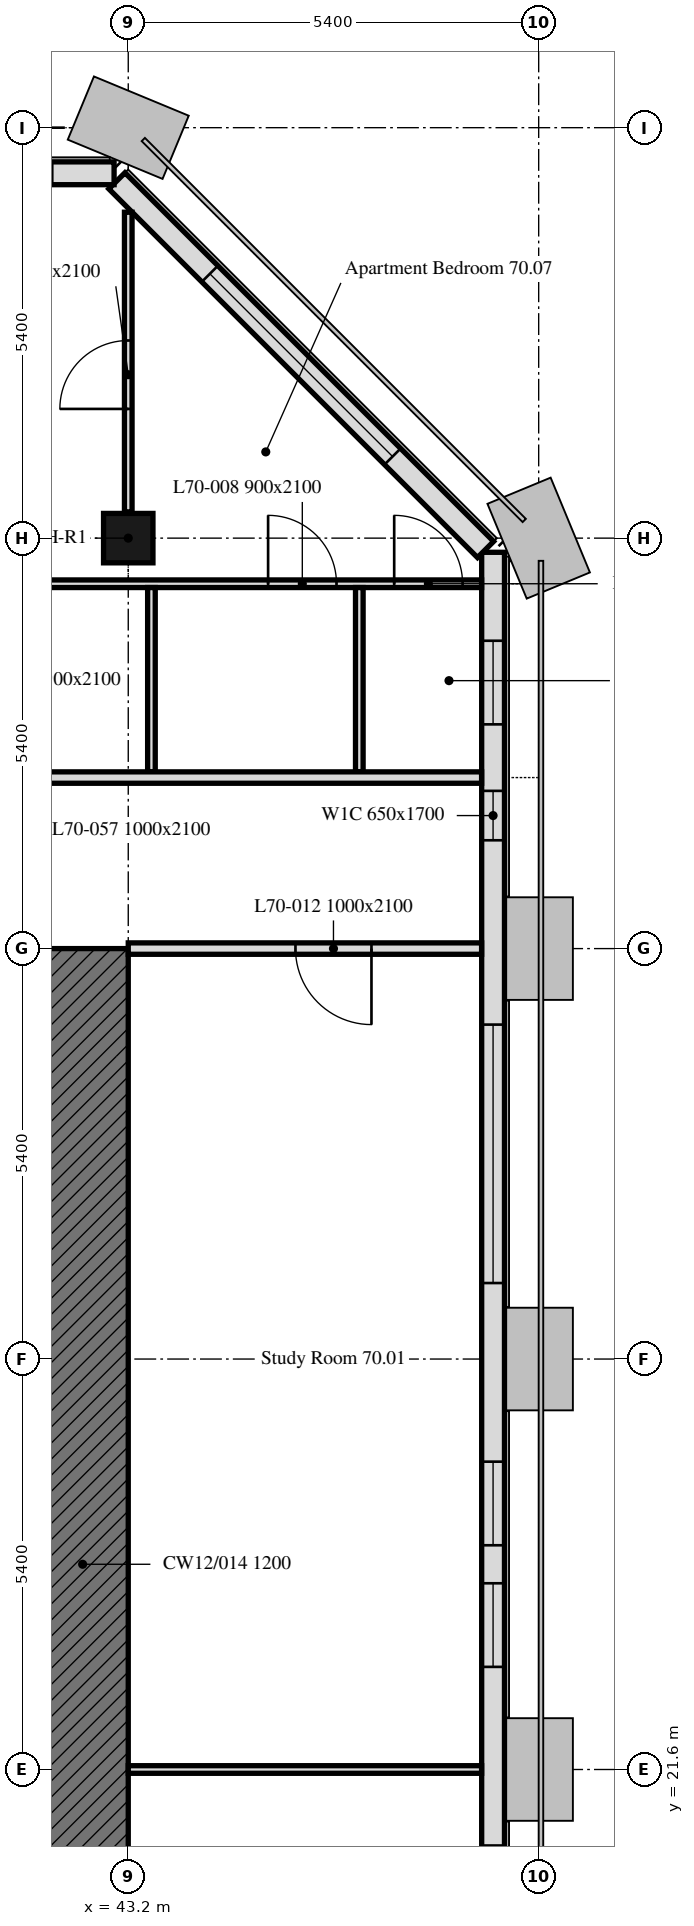
"""IFC4 building model, lengths in metres.
Left out: names, types, materials, properties, quantities, classifications, styles, units other than length and angle.
Written with IfcOpenShell. Run it as: python <this file> out.ifc"""

import sys

from ifc_helpers import new_model, si_unit, direction, frame, frame_2d, origin, origin_2d, place, context, subcontext, project, spatial, rectangle, extrude, element, fill, save


model = new_model("IFC4")
c1 = context("Model", 3, precision=1e-05, world=origin(), true_north=direction((0.0, 1.0)))
c2 = subcontext(c1, "Body", "Model", "MODEL_VIEW")
j1 = project(units=[si_unit("LENGTHUNIT", "METRE"), si_unit("PLANEANGLEUNIT", "RADIAN")], contexts=[c1])
p1 = place(None, origin())
s1 = spatial("IfcSite", under=j1, at=p1, CompositionType="ELEMENT")
p2 = place(p1, origin())
s2 = spatial("IfcBuilding", under=s1, at=p2, CompositionType="ELEMENT")
p3 = place(p2, frame((0.0, 0.0, 285.1)))
s3 = spatial("IfcBuildingStorey", under=s2, at=p3, CompositionType="ELEMENT", Elevation=285.1)
p4 = place(p3, frame((43.2, 37.8, 0.0), z_axis=(0.0, 0.0, 1.0), x_axis=(1.0, 0.0, 0.0)))
e1 = element("IfcColumn", 1, at=p4, inside=s3, PredefinedType="COLUMN", context=c2, shape_type="SweptSolid", body=[
    extrude(rectangle(XDim=0.65, YDim=0.65, at=origin_2d()), origin(), (0.0, 0.0, 1.0), 3.0),
])
p5 = place(p3, frame((48.0, 5.586, 0.0), z_axis=(0.0, 0.0, 1.0), x_axis=(0.0, 1.0, 0.0)))
e2 = element("IfcWall", 2, at=p5, inside=s3, PredefinedType="SOLIDWALL", context=c2, shape_type="SweptSolid", body=[
    extrude(rectangle(XDim=32.027, YDim=0.3, at=frame_2d((16.014, 0.0))), origin(), (0.0, 0.0, 1.0), 3.0),
])
p6 = place(p5, frame((0.814, 0.0, 0.9)))
e3 = element("IfcOpeningElement", 3, at=p6, cuts=e2, PredefinedType="OPENING", context=c2, shape_type="SweptSolid", body=[
    extrude(rectangle(XDim=3.4, YDim=1.7, at=frame_2d((1.7, 0.85))), frame((0.0, 0.16, 0.0), z_axis=(0.0, -1.0, 0.0), x_axis=(1.0, 0.0, 0.0)), (0.0, 0.0, 1.0), 0.32),
])
p7 = place(p5, frame((6.564, 0.0, 0.9)))
e4 = element("IfcOpeningElement", 4, at=p7, cuts=e2, PredefinedType="OPENING", context=c2, shape_type="SweptSolid", body=[
    extrude(rectangle(XDim=1.1, YDim=1.7, at=frame_2d((0.55, 0.85))), frame((0.0, 0.16, 0.0), z_axis=(0.0, -1.0, 0.0), x_axis=(1.0, 0.0, 0.0)), (0.0, 0.0, 1.0), 0.32),
])
p8 = place(p5, frame((8.514, 0.0, 0.9)))
e5 = element("IfcOpeningElement", 5, at=p8, cuts=e2, PredefinedType="OPENING", context=c2, shape_type="SweptSolid", body=[
    extrude(rectangle(XDim=1.1, YDim=1.7, at=frame_2d((0.55, 0.85))), frame((0.0, 0.16, 0.0), z_axis=(0.0, -1.0, 0.0), x_axis=(1.0, 0.0, 0.0)), (0.0, 0.0, 1.0), 0.32),
])
p9 = place(p5, frame((11.614, 0.0, 0.9)))
e6 = element("IfcOpeningElement", 6, at=p9, cuts=e2, PredefinedType="OPENING", context=c2, shape_type="SweptSolid", body=[
    extrude(rectangle(XDim=3.4, YDim=1.7, at=frame_2d((1.7, 0.85))), frame((0.0, 0.16, 0.0), z_axis=(0.0, -1.0, 0.0), x_axis=(1.0, 0.0, 0.0)), (0.0, 0.0, 1.0), 0.32),
])
p10 = place(p5, frame((17.364, 0.0, 0.9)))
e7 = element("IfcOpeningElement", 7, at=p10, cuts=e2, PredefinedType="OPENING", context=c2, shape_type="SweptSolid", body=[
    extrude(rectangle(XDim=1.1, YDim=1.7, at=frame_2d((0.55, 0.85))), frame((0.0, 0.16, 0.0), z_axis=(0.0, -1.0, 0.0), x_axis=(1.0, 0.0, 0.0)), (0.0, 0.0, 1.0), 0.32),
])
p11 = place(p5, frame((18.964, 0.0, 0.9)))
e8 = element("IfcOpeningElement", 8, at=p11, cuts=e2, PredefinedType="OPENING", context=c2, shape_type="SweptSolid", body=[
    extrude(rectangle(XDim=1.1, YDim=1.7, at=frame_2d((0.55, 0.85))), frame((0.0, 0.16, 0.0), z_axis=(0.0, -1.0, 0.0), x_axis=(1.0, 0.0, 0.0)), (0.0, 0.0, 1.0), 0.32),
])
p12 = place(p5, frame((22.414, 0.0, 0.9)))
e9 = element("IfcOpeningElement", 9, at=p12, cuts=e2, PredefinedType="OPENING", context=c2, shape_type="SweptSolid", body=[
    extrude(rectangle(XDim=3.4, YDim=1.7, at=frame_2d((1.7, 0.85))), frame((0.0, 0.16, 0.0), z_axis=(0.0, -1.0, 0.0), x_axis=(1.0, 0.0, 0.0)), (0.0, 0.0, 1.0), 0.32),
])
p13 = place(p5, frame((28.239, 0.0, 0.9)))
e10 = element("IfcOpeningElement", 10, at=p13, cuts=e2, PredefinedType="OPENING", context=c2, shape_type="SweptSolid", body=[
    extrude(rectangle(XDim=0.65, YDim=1.7, at=frame_2d((0.325, 0.85))), frame((0.0, 0.16, 0.0), z_axis=(0.0, -1.0, 0.0), x_axis=(1.0, 0.0, 0.0)), (0.0, 0.0, 1.0), 0.32),
])
p14 = place(p5, frame((29.764, 0.0, 0.9)))
e11 = element("IfcOpeningElement", 11, at=p14, cuts=e2, PredefinedType="OPENING", context=c2, shape_type="SweptSolid", body=[
    extrude(rectangle(XDim=1.1, YDim=1.7, at=frame_2d((0.55, 0.85))), frame((0.0, 0.16, 0.0), z_axis=(0.0, -1.0, 0.0), x_axis=(1.0, 0.0, 0.0)), (0.0, 0.0, 1.0), 0.32),
])
p15 = place(p3, frame((47.901, 37.65, 0.0), z_axis=(0.0, 0.0, 1.0), x_axis=(-0.707106781187, 0.707106781187, 0.0)))
e12 = element("IfcWall", 12, at=p15, inside=s3, PredefinedType="SOLIDWALL", context=c2, shape_type="SweptSolid", body=[
    extrude(rectangle(XDim=6.86, YDim=0.3, at=frame_2d((3.43, 0.0))), origin(), (0.0, 0.0, 1.0), 3.0),
])
p16 = place(p15, frame((1.73, 0.0, 0.9)))
e13 = element("IfcOpeningElement", 13, at=p16, cuts=e12, PredefinedType="OPENING", context=c2, shape_type="SweptSolid", body=[
    extrude(rectangle(XDim=3.4, YDim=1.7, at=frame_2d((1.7, 0.85))), frame((0.0, 0.16, 0.0), z_axis=(0.0, -1.0, 0.0), x_axis=(1.0, 0.0, 0.0)), (0.0, 0.0, 1.0), 0.32),
])
p17 = place(p3, frame((43.014, 42.6, 0.0), z_axis=(0.0, 0.0, 1.0), x_axis=(-1.0, 0.0, 0.0)))
e14 = element("IfcWall", 14, at=p17, inside=s3, PredefinedType="SOLIDWALL", context=c2, shape_type="SweptSolid", body=[
    extrude(rectangle(XDim=32.027, YDim=0.3, at=frame_2d((16.014, 0.0))), origin(), (0.0, 0.0, 1.0), 3.0),
])
p18 = place(p17, frame((0.814, 0.0, 0.9)))
e15 = element("IfcOpeningElement", 15, at=p18, cuts=e14, PredefinedType="OPENING", context=c2, shape_type="SweptSolid", body=[
    extrude(rectangle(XDim=3.4, YDim=1.7, at=frame_2d((1.7, 0.85))), frame((0.0, 0.16, 0.0), z_axis=(0.0, -1.0, 0.0), x_axis=(1.0, 0.0, 0.0)), (0.0, 0.0, 1.0), 0.32),
])
p19 = place(p17, frame((6.564, 0.0, 0.9)))
e16 = element("IfcOpeningElement", 16, at=p19, cuts=e14, PredefinedType="OPENING", context=c2, shape_type="SweptSolid", body=[
    extrude(rectangle(XDim=1.1, YDim=1.7, at=frame_2d((0.55, 0.85))), frame((0.0, 0.16, 0.0), z_axis=(0.0, -1.0, 0.0), x_axis=(1.0, 0.0, 0.0)), (0.0, 0.0, 1.0), 0.32),
])
p20 = place(p17, frame((11.614, 0.0, 0.9)))
e17 = element("IfcOpeningElement", 17, at=p20, cuts=e14, PredefinedType="OPENING", context=c2, shape_type="SweptSolid", body=[
    extrude(rectangle(XDim=3.4, YDim=1.7, at=frame_2d((1.7, 0.85))), frame((0.0, 0.16, 0.0), z_axis=(0.0, -1.0, 0.0), x_axis=(1.0, 0.0, 0.0)), (0.0, 0.0, 1.0), 0.32),
])
p21 = place(p17, frame((17.364, 0.0, 0.9)))
e18 = element("IfcOpeningElement", 18, at=p21, cuts=e14, PredefinedType="OPENING", context=c2, shape_type="SweptSolid", body=[
    extrude(rectangle(XDim=1.1, YDim=1.7, at=frame_2d((0.55, 0.85))), frame((0.0, 0.16, 0.0), z_axis=(0.0, -1.0, 0.0), x_axis=(1.0, 0.0, 0.0)), (0.0, 0.0, 1.0), 0.32),
])
p22 = place(p17, frame((22.414, 0.0, 0.9)))
e19 = element("IfcOpeningElement", 19, at=p22, cuts=e14, PredefinedType="OPENING", context=c2, shape_type="SweptSolid", body=[
    extrude(rectangle(XDim=3.4, YDim=1.7, at=frame_2d((1.7, 0.85))), frame((0.0, 0.16, 0.0), z_axis=(0.0, -1.0, 0.0), x_axis=(1.0, 0.0, 0.0)), (0.0, 0.0, 1.0), 0.32),
])
p23 = place(p17, frame((28.164, 0.0, 0.9)))
e20 = element("IfcOpeningElement", 20, at=p23, cuts=e14, PredefinedType="OPENING", context=c2, shape_type="SweptSolid", body=[
    extrude(rectangle(XDim=1.1, YDim=1.7, at=frame_2d((0.55, 0.85))), frame((0.0, 0.16, 0.0), z_axis=(0.0, -1.0, 0.0), x_axis=(1.0, 0.0, 0.0)), (0.0, 0.0, 1.0), 0.32),
])
p24 = place(p3, frame((42.6, 32.4, 0.0), z_axis=(0.0, 0.0, 1.0), x_axis=(0.0, -1.0, 0.0)))
e21 = element("IfcWall", 21, at=p24, inside=s3, PredefinedType="SOLIDWALL", context=c2, shape_type="SweptSolid", body=[
    extrude(rectangle(XDim=16.2, YDim=1.2, at=frame_2d((8.1, 0.0))), origin(), (0.0, 0.0, 1.0), 3.0),
])
p25 = place(p3, frame((43.2, 38.145, 0.0), z_axis=(0.0, 0.0, 1.0), x_axis=(0.0, 1.0, 0.0)))
e22 = element("IfcWall", 22, at=p25, inside=s3, PredefinedType="PARTITIONING", context=c2, shape_type="SweptSolid", body=[
    extrude(rectangle(XDim=3.943, YDim=0.1, at=frame_2d((1.971, 0.0))), origin(), (0.0, 0.0, 1.0), 3.0),
])
p26 = place(p25, frame((1.355, 0.0, 0.0)))
e23 = element("IfcOpeningElement", 23, at=p26, cuts=e22, PredefinedType="OPENING", context=c2, shape_type="SweptSolid", body=[
    extrude(rectangle(XDim=0.9, YDim=2.1, at=frame_2d((0.45, 1.05))), frame((0.0, 0.05, 0.0), z_axis=(0.0, -1.0, 0.0), x_axis=(1.0, 0.0, 0.0)), (0.0, 0.0, 1.0), 0.1),
])
p27 = place(p3, frame((37.875, 37.2, 0.0), z_axis=(0.0, 0.0, 1.0), x_axis=(1.0, 0.0, 0.0)))
e24 = element("IfcWall", 24, at=p27, inside=s3, PredefinedType="PARTITIONING", context=c2, shape_type="SweptSolid", body=[
    extrude(rectangle(XDim=9.974, YDim=0.1, at=frame_2d((4.987, 0.0))), origin(), (0.0, 0.0, 1.0), 3.0),
])
p28 = place(p27, frame((7.165, 0.0, 0.0)))
e25 = element("IfcOpeningElement", 25, at=p28, cuts=e24, PredefinedType="OPENING", context=c2, shape_type="SweptSolid", body=[
    extrude(rectangle(XDim=0.9, YDim=2.1, at=frame_2d((0.45, 1.05))), frame((0.0, 0.05, 0.0), z_axis=(0.0, -1.0, 0.0), x_axis=(1.0, 0.0, 0.0)), (0.0, 0.0, 1.0), 0.1),
])
p29 = place(p27, frame((8.824, 0.0, 0.0)))
e26 = element("IfcOpeningElement", 26, at=p29, cuts=e24, PredefinedType="OPENING", context=c2, shape_type="SweptSolid", body=[
    extrude(rectangle(XDim=0.9, YDim=2.1, at=frame_2d((0.45, 1.05))), frame((0.0, 0.05, 0.0), z_axis=(0.0, -1.0, 0.0), x_axis=(1.0, 0.0, 0.0)), (0.0, 0.0, 1.0), 0.1),
])
p30 = place(p27, frame((1.6, 0.0, 0.0)))
e27 = element("IfcOpeningElement", 27, at=p30, cuts=e24, PredefinedType="OPENING", context=c2, shape_type="SweptSolid", body=[
    extrude(rectangle(XDim=0.9, YDim=2.1, at=frame_2d((0.45, 1.05))), frame((0.0, 0.05, 0.0), z_axis=(0.0, -1.0, 0.0), x_axis=(1.0, 0.0, 0.0)), (0.0, 0.0, 1.0), 0.1),
])
for number, where, z_axis, x_axis in (
    (28, (43.505, 34.725, 0.0), (0.0, 0.0, 1.0), (0.0, 1.0, 0.0)),
    (29, (46.24, 34.725, 0.0), (0.0, 0.0, 1.0), (0.0, 1.0, 0.0)),
):
    element("IfcWall", number, at=place(p3, frame(where, z_axis=z_axis, x_axis=x_axis)), inside=s3, PredefinedType="PARTITIONING", context=c2, shape_type="SweptSolid", body=[
        extrude(rectangle(XDim=2.425, YDim=0.1, at=frame_2d((1.212, 0.0))), origin(), (0.0, 0.0, 1.0), 3.0),
    ])
p31 = place(p3, frame((6.151, 34.65, 0.0), z_axis=(0.0, 0.0, 1.0), x_axis=(1.0, 0.0, 0.0)))
e30 = element("IfcWall", 30, at=p31, inside=s3, PredefinedType="PARTITIONING", context=c2, shape_type="SweptSolid", body=[
    extrude(rectangle(XDim=41.698, YDim=0.15, at=frame_2d((20.849, 0.0))), origin(), (0.0, 0.0, 1.0), 2.4),
])
p32 = place(p31, frame((2.519, 0.0, 0.0)))
e31 = element("IfcOpeningElement", 31, at=p32, cuts=e30, PredefinedType="OPENING", context=c2, shape_type="SweptSolid", body=[
    extrude(rectangle(XDim=1.0, YDim=2.1, at=frame_2d((0.5, 1.05))), frame((0.0, 0.075, 0.0), z_axis=(0.0, -1.0, 0.0), x_axis=(1.0, 0.0, 0.0)), (0.0, 0.0, 1.0), 0.15),
])
p33 = place(p31, frame((13.077, 0.0, 0.0)))
e32 = element("IfcOpeningElement", 32, at=p33, cuts=e30, PredefinedType="OPENING", context=c2, shape_type="SweptSolid", body=[
    extrude(rectangle(XDim=1.0, YDim=2.1, at=frame_2d((0.5, 1.05))), frame((0.0, 0.075, 0.0), z_axis=(0.0, -1.0, 0.0), x_axis=(1.0, 0.0, 0.0)), (0.0, 0.0, 1.0), 0.15),
])
p34 = place(p31, frame((32.649, 0.0, 0.0)))
e33 = element("IfcOpeningElement", 33, at=p34, cuts=e30, PredefinedType="OPENING", context=c2, shape_type="SweptSolid", body=[
    extrude(rectangle(XDim=1.0, YDim=2.1, at=frame_2d((0.5, 1.05))), frame((0.0, 0.075, 0.0), z_axis=(0.0, -1.0, 0.0), x_axis=(1.0, 0.0, 0.0)), (0.0, 0.0, 1.0), 0.15),
])
p35 = place(p3, frame((47.849, 32.4, 0.0), z_axis=(0.0, 0.0, 1.0), x_axis=(-1.0, 0.0, 0.0)))
e34 = element("IfcWall", 34, at=p35, inside=s3, PredefinedType="PARTITIONING", context=c2, shape_type="SweptSolid", body=[
    extrude(rectangle(XDim=4.649, YDim=0.15, at=frame_2d((2.325, 0.0))), origin(), (0.0, 0.0, 1.0), 2.4),
])
p36 = place(p35, frame((1.449, 0.0, 0.0)))
e35 = element("IfcOpeningElement", 35, at=p36, cuts=e34, PredefinedType="OPENING", context=c2, shape_type="SweptSolid", body=[
    extrude(rectangle(XDim=1.0, YDim=2.1, at=frame_2d((0.5, 1.05))), frame((0.0, 0.075, 0.0), z_axis=(0.0, -1.0, 0.0), x_axis=(1.0, 0.0, 0.0)), (0.0, 0.0, 1.0), 0.15),
])
p37 = place(p3, frame((43.2, 21.6, 0.0), z_axis=(0.0, 0.0, 1.0), x_axis=(1.0, 0.0, 0.0)))
e36 = element("IfcWall", 36, at=p37, inside=s3, PredefinedType="PARTITIONING", context=c2, shape_type="SweptSolid", body=[
    extrude(rectangle(XDim=4.649, YDim=0.1, at=frame_2d((2.325, 0.0))), origin(), (0.0, 0.0, 1.0), 2.4),
])
p38 = place(p10, origin())
e37 = element("IfcWindow", 37, at=p38, inside=s3, PartitioningType="SINGLE_PANEL", PredefinedType="WINDOW", context=c2, shape_type="SweptSolid", body=[
    extrude(rectangle(XDim=1.1, YDim=1.7, at=frame_2d((0.55, 0.85))), frame((0.0, 0.03, 0.0), z_axis=(0.0, -1.0, 0.0), x_axis=(1.0, 0.0, 0.0)), (0.0, 0.0, 1.0), 0.06),
])
fill(e7, e37)
p39 = place(p11, origin())
e38 = element("IfcWindow", 38, at=p39, inside=s3, PartitioningType="SINGLE_PANEL", PredefinedType="WINDOW", context=c2, shape_type="SweptSolid", body=[
    extrude(rectangle(XDim=1.1, YDim=1.7, at=frame_2d((0.55, 0.85))), frame((0.0, 0.03, 0.0), z_axis=(0.0, -1.0, 0.0), x_axis=(1.0, 0.0, 0.0)), (0.0, 0.0, 1.0), 0.06),
])
fill(e8, e38)
p40 = place(p12, origin())
e39 = element("IfcWindow", 39, at=p40, inside=s3, PartitioningType="SINGLE_PANEL", PredefinedType="WINDOW", context=c2, shape_type="SweptSolid", body=[
    extrude(rectangle(XDim=3.4, YDim=1.7, at=frame_2d((1.7, 0.85))), frame((0.0, 0.03, 0.0), z_axis=(0.0, -1.0, 0.0), x_axis=(1.0, 0.0, 0.0)), (0.0, 0.0, 1.0), 0.06),
])
fill(e9, e39)
p41 = place(p13, origin())
e40 = element("IfcWindow", 40, at=p41, inside=s3, PartitioningType="SINGLE_PANEL", PredefinedType="WINDOW", context=c2, shape_type="SweptSolid", body=[
    extrude(rectangle(XDim=0.65, YDim=1.7, at=frame_2d((0.325, 0.85))), frame((0.0, 0.03, 0.0), z_axis=(0.0, -1.0, 0.0), x_axis=(1.0, 0.0, 0.0)), (0.0, 0.0, 1.0), 0.06),
])
fill(e10, e40)
p42 = place(p14, origin())
e41 = element("IfcWindow", 41, at=p42, inside=s3, PartitioningType="SINGLE_PANEL", PredefinedType="WINDOW", context=c2, shape_type="SweptSolid", body=[
    extrude(rectangle(XDim=1.1, YDim=1.7, at=frame_2d((0.55, 0.85))), frame((0.0, 0.03, 0.0), z_axis=(0.0, -1.0, 0.0), x_axis=(1.0, 0.0, 0.0)), (0.0, 0.0, 1.0), 0.06),
])
fill(e11, e41)
p43 = place(p16, origin())
e42 = element("IfcWindow", 42, at=p43, inside=s3, PartitioningType="SINGLE_PANEL", PredefinedType="WINDOW", context=c2, shape_type="SweptSolid", body=[
    extrude(rectangle(XDim=3.4, YDim=1.7, at=frame_2d((1.7, 0.85))), frame((0.0, 0.03, 0.0), z_axis=(0.0, -1.0, 0.0), x_axis=(1.0, 0.0, 0.0)), (0.0, 0.0, 1.0), 0.06),
])
fill(e13, e42)
p44 = place(p28, origin())
e43 = element("IfcDoor", 43, at=p44, inside=s3, OperationType="SINGLE_SWING_RIGHT", PredefinedType="DOOR", context=c2, shape_type="SweptSolid", body=[
    extrude(rectangle(XDim=0.9, YDim=2.1, at=frame_2d((0.45, 1.05))), frame((0.0, 0.025, 0.0), z_axis=(0.0, -1.0, 0.0), x_axis=(1.0, 0.0, 0.0)), (0.0, 0.0, 1.0), 0.05),
])
fill(e25, e43)
p45 = place(p29, origin())
e44 = element("IfcDoor", 44, at=p45, inside=s3, OperationType="SINGLE_SWING_LEFT", PredefinedType="DOOR", context=c2, shape_type="SweptSolid", body=[
    extrude(rectangle(XDim=0.9, YDim=2.1, at=frame_2d((0.45, 1.05))), frame((0.0, 0.025, 0.0), z_axis=(0.0, -1.0, 0.0), x_axis=(1.0, 0.0, 0.0)), (0.0, 0.0, 1.0), 0.05),
])
fill(e26, e44)
p46 = place(p36, origin())
e45 = element("IfcDoor", 45, at=p46, inside=s3, OperationType="SINGLE_SWING_RIGHT", PredefinedType="DOOR", context=c2, shape_type="SweptSolid", body=[
    extrude(rectangle(XDim=1.0, YDim=2.1, at=frame_2d((0.5, 1.05))), frame((0.0, 0.025, 0.0), z_axis=(0.0, -1.0, 0.0), x_axis=(1.0, 0.0, 0.0)), (0.0, 0.0, 1.0), 0.05),
])
fill(e35, e45)
p47 = place(p26, origin())
e46 = element("IfcDoor", 46, at=p47, inside=s3, OperationType="SINGLE_SWING_LEFT", PredefinedType="DOOR", context=c2, shape_type="SweptSolid", body=[
    extrude(rectangle(XDim=0.9, YDim=2.1, at=frame_2d((0.45, 1.05))), frame((0.0, 0.025, 0.0), z_axis=(0.0, -1.0, 0.0), x_axis=(1.0, 0.0, 0.0)), (0.0, 0.0, 1.0), 0.05),
])
fill(e23, e46)
save(model, sys.argv[1])
